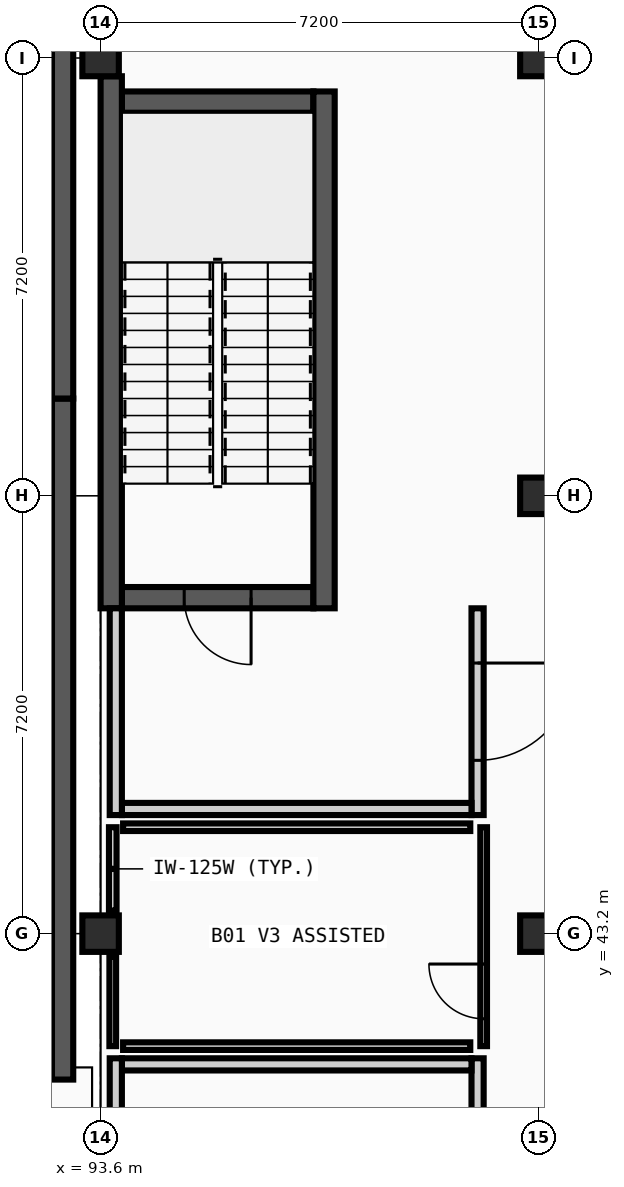
"""IFC4 building model, lengths in metres.
Left out: names, types, materials, properties, quantities, classifications, styles, units other than length and angle.
Written with IfcOpenShell. Run it as: python <this file> out.ifc"""

import sys

from ifc_helpers import new_model, si_unit, direction, frame, frame_2d, origin, origin_2d, place, context, subcontext, project, spatial, rectangle, extrude, element, fill, save


model = new_model("IFC4")
c1 = context("Model", 3, precision=1e-05, world=origin(), true_north=direction((0.0, 1.0)))
c2 = subcontext(c1, "Body", "Model", "MODEL_VIEW")
j1 = project(units=[si_unit("LENGTHUNIT", "METRE"), si_unit("PLANEANGLEUNIT", "RADIAN")], contexts=[c1])
p1 = place(None, origin())
s1 = spatial("IfcSite", under=j1, at=p1, CompositionType="ELEMENT")
p2 = place(p1, origin())
s2 = spatial("IfcBuilding", under=s1, at=p2, CompositionType="ELEMENT")
p3 = place(p2, frame((0.0, 0.0, -4.8)))
s3 = spatial("IfcBuildingStorey", under=s2, at=p3, CompositionType="ELEMENT", Elevation=-4.8)
for number, where, z_axis, x_axis in (
    (1, (93.6, 43.2, 0.0), (0.0, 0.0, 1.0), (1.0, 0.0, 0.0)),
    (2, (93.6, 57.6, 0.0), (0.0, 0.0, 1.0), (1.0, 0.0, 0.0)),
    (3, (100.8, 43.2, 0.0), (0.0, 0.0, 1.0), (1.0, 0.0, 0.0)),
    (4, (100.8, 50.4, 0.0), (0.0, 0.0, 1.0), (1.0, 0.0, 0.0)),
    (5, (100.8, 57.6, 0.0), (0.0, 0.0, 1.0), (1.0, 0.0, 0.0)),
):
    element("IfcColumn", number, at=place(p3, frame(where, z_axis=z_axis, x_axis=x_axis)), inside=s3, PredefinedType="COLUMN", context=c2, shape_type="SweptSolid", body=[
        extrude(rectangle(XDim=0.6, YDim=0.6, at=origin_2d()), origin(), (0.0, 0.0, 1.0), 4.8),
    ])
p4 = place(p3, frame((92.975, 40.8, 0.0), z_axis=(0.0, 0.0, 1.0), x_axis=(0.0, 1.0, 0.0)))
e6 = element("IfcWall", 6, at=p4, inside=s3, PredefinedType="USERDEFINED", context=c2, shape_type="SweptSolid", body=[
    extrude(rectangle(XDim=11.2, YDim=0.35, at=frame_2d((5.6, 0.0))), origin(), (0.0, 0.0, 1.0), 4.58),
])
p5 = place(p3, frame((92.975, 52.0, 0.0), z_axis=(0.0, 0.0, 1.0), x_axis=(0.0, 1.0, 0.0)))
e7 = element("IfcWall", 7, at=p5, inside=s3, PredefinedType="USERDEFINED", context=c2, shape_type="SweptSolid", body=[
    extrude(rectangle(XDim=11.0, YDim=0.35, at=frame_2d((5.5, 0.0))), origin(), (0.0, 0.0, 1.0), 4.58),
])
p6 = place(p3, frame((99.8, 37.75, 0.0), z_axis=(0.0, 0.0, 1.0), x_axis=(0.0, 1.0, 0.0)))
e8 = element("IfcWall", 8, at=p6, inside=s3, PredefinedType="PARTITIONING", context=c2, shape_type="SweptSolid", body=[
    extrude(rectangle(XDim=3.4, YDim=0.2, at=frame_2d((1.7, 0.0))), origin(), (0.0, 0.0, 1.0), 4.545),
])
p7 = place(p6, frame((0.9, 0.0, 0.0)))
e9 = element("IfcOpeningElement", 9, at=p7, cuts=e8, PredefinedType="OPENING", context=c2, shape_type="SweptSolid", body=[
    extrude(rectangle(XDim=1.6, YDim=2.2, at=frame_2d((0.8, 1.1))), frame((0.0, 0.11, 0.0), z_axis=(0.0, -1.0, 0.0), x_axis=(1.0, 0.0, 0.0)), (0.0, 0.0, 1.0), 0.22),
])
p8 = place(p3, frame((93.95, 41.05, 0.0), z_axis=(0.0, 0.0, 1.0), x_axis=(1.0, 0.0, 0.0)))
e10 = element("IfcWall", 10, at=p8, inside=s3, PredefinedType="PARTITIONING", context=c2, shape_type="SweptSolid", body=[
    extrude(rectangle(XDim=5.75, YDim=0.2, at=frame_2d((2.875, 0.0))), origin(), (0.0, 0.0, 1.0), 4.545),
])
p9 = place(p3, frame((93.85, 37.75, 0.0), z_axis=(0.0, 0.0, 1.0), x_axis=(0.0, 1.0, 0.0)))
e11 = element("IfcWall", 11, at=p9, inside=s3, PredefinedType="PARTITIONING", context=c2, shape_type="SweptSolid", body=[
    extrude(rectangle(XDim=3.4, YDim=0.2, at=frame_2d((1.7, 0.0))), origin(), (0.0, 0.0, 1.0), 4.545),
])
p10 = place(p3, frame((93.95, 48.725, 0.0), z_axis=(0.0, 0.0, 1.0), x_axis=(1.0, 0.0, 0.0)))
e12 = element("IfcWall", 12, at=p10, inside=s3, PredefinedType="SHEAR", context=c2, shape_type="SweptSolid", body=[
    extrude(rectangle(XDim=3.15, YDim=0.35, at=frame_2d((1.575, 0.0))), origin(), (0.0, 0.0, 1.0), 4.545),
])
p11 = place(p10, frame((1.025, 0.0, 0.0)))
e13 = element("IfcOpeningElement", 13, at=p11, cuts=e12, PredefinedType="OPENING", context=c2, shape_type="SweptSolid", body=[
    extrude(rectangle(XDim=1.1, YDim=2.15, at=frame_2d((0.55, 1.075))), frame((0.0, 0.185, 0.0), z_axis=(0.0, -1.0, 0.0), x_axis=(1.0, 0.0, 0.0)), (0.0, 0.0, 1.0), 0.37),
])
p12 = place(p3, frame((93.95, 56.875, 0.0), z_axis=(0.0, 0.0, 1.0), x_axis=(1.0, 0.0, 0.0)))
e14 = element("IfcWall", 14, at=p12, inside=s3, PredefinedType="SHEAR", context=c2, shape_type="SweptSolid", body=[
    extrude(rectangle(XDim=3.15, YDim=0.35, at=frame_2d((1.575, 0.0))), origin(), (0.0, 0.0, 1.0), 4.545),
])
p13 = place(p3, frame((93.775, 48.55, 0.0), z_axis=(0.0, 0.0, 1.0), x_axis=(0.0, 1.0, 0.0)))
e15 = element("IfcWall", 15, at=p13, inside=s3, PredefinedType="SHEAR", context=c2, shape_type="SweptSolid", body=[
    extrude(rectangle(XDim=8.75, YDim=0.35, at=frame_2d((4.375, 0.0))), origin(), (0.0, 0.0, 1.0), 4.545),
])
p14 = place(p3, frame((97.275, 48.55, 0.0), z_axis=(0.0, 0.0, 1.0), x_axis=(0.0, 1.0, 0.0)))
e16 = element("IfcWall", 16, at=p14, inside=s3, PredefinedType="SHEAR", context=c2, shape_type="SweptSolid", body=[
    extrude(rectangle(XDim=8.5, YDim=0.35, at=frame_2d((4.25, 0.0))), origin(), (0.0, 0.0, 1.0), 4.545),
])
p15 = place(p3, frame((99.8, 45.15, 0.0), z_axis=(0.0, 0.0, 1.0), x_axis=(0.0, 1.0, 0.0)))
e17 = element("IfcWall", 17, at=p15, inside=s3, PredefinedType="PARTITIONING", context=c2, shape_type="SweptSolid", body=[
    extrude(rectangle(XDim=3.4, YDim=0.2, at=frame_2d((1.7, 0.0))), origin(), (0.0, 0.0, 1.0), 4.545),
])
p16 = place(p15, frame((0.9, 0.0, 0.0)))
e18 = element("IfcOpeningElement", 18, at=p16, cuts=e17, PredefinedType="OPENING", context=c2, shape_type="SweptSolid", body=[
    extrude(rectangle(XDim=1.6, YDim=2.2, at=frame_2d((0.8, 1.1))), frame((0.0, 0.11, 0.0), z_axis=(0.0, -1.0, 0.0), x_axis=(1.0, 0.0, 0.0)), (0.0, 0.0, 1.0), 0.22),
])
p17 = place(p3, frame((93.95, 45.25, 0.0), z_axis=(0.0, 0.0, 1.0), x_axis=(1.0, 0.0, 0.0)))
e19 = element("IfcWall", 19, at=p17, inside=s3, PredefinedType="PARTITIONING", context=c2, shape_type="SweptSolid", body=[
    extrude(rectangle(XDim=5.75, YDim=0.2, at=frame_2d((2.875, 0.0))), origin(), (0.0, 0.0, 1.0), 4.545),
])
p18 = place(p3, frame((93.85, 45.15, 0.0), z_axis=(0.0, 0.0, 1.0), x_axis=(0.0, 1.0, 0.0)))
e20 = element("IfcWall", 20, at=p18, inside=s3, PredefinedType="PARTITIONING", context=c2, shape_type="SweptSolid", body=[
    extrude(rectangle(XDim=3.4, YDim=0.2, at=frame_2d((1.7, 0.0))), origin(), (0.0, 0.0, 1.0), 4.545),
])
for number, where, z_axis, x_axis in (
    (21, (93.97, 41.35, 0.0), (0.0, 0.0, 1.0), (1.0, 0.0, 0.0)),
    (22, (93.97, 44.95, 0.0), (0.0, 0.0, 1.0), (1.0, 0.0, 0.0)),
):
    element("IfcWall", number, at=place(p3, frame(where, z_axis=z_axis, x_axis=x_axis)), inside=s3, PredefinedType="PARTITIONING", context=c2, shape_type="SweptSolid", body=[
        extrude(rectangle(XDim=5.71, YDim=0.125, at=frame_2d((2.855, 0.0))), origin(), (0.0, 0.0, 1.0), 4.545),
    ])
p19 = place(p3, frame((93.8, 41.35, 0.0), z_axis=(0.0, 0.0, 1.0), x_axis=(0.0, 1.0, 0.0)))
e23 = element("IfcWall", 23, at=p19, inside=s3, PredefinedType="PARTITIONING", context=c2, shape_type="SweptSolid", body=[
    extrude(rectangle(XDim=1.47, YDim=0.11, at=frame_2d((0.735, 0.0))), origin(), (0.0, 0.0, 1.0), 4.545),
])
p20 = place(p3, frame((93.8, 43.58, 0.0), z_axis=(0.0, 0.0, 1.0), x_axis=(0.0, 1.0, 0.0)))
e24 = element("IfcWall", 24, at=p20, inside=s3, PredefinedType="PARTITIONING", context=c2, shape_type="SweptSolid", body=[
    extrude(rectangle(XDim=1.37, YDim=0.125, at=frame_2d((0.685, 0.0))), origin(), (0.0, 0.0, 1.0), 4.545),
])
p21 = place(p3, frame((99.9, 41.35, 0.0), z_axis=(0.0, 0.0, 1.0), x_axis=(0.0, 1.0, 0.0)))
e25 = element("IfcWall", 25, at=p21, inside=s3, PredefinedType="PARTITIONING", context=c2, shape_type="SweptSolid", body=[
    extrude(rectangle(XDim=3.6, YDim=0.11, at=frame_2d((1.8, 0.0))), origin(), (0.0, 0.0, 1.0), 4.545),
])
p22 = place(p21, frame((0.45, 0.0, 0.0)))
e26 = element("IfcOpeningElement", 26, at=p22, cuts=e25, PredefinedType="OPENING", context=c2, shape_type="SweptSolid", body=[
    extrude(rectangle(XDim=0.9, YDim=2.1, at=frame_2d((0.45, 1.05))), frame((0.0, 0.065, 0.0), z_axis=(0.0, -1.0, 0.0), x_axis=(1.0, 0.0, 0.0)), (0.0, 0.0, 1.0), 0.13),
])
p23 = place(p11, origin())
e27 = element("IfcDoor", 27, at=p23, inside=s3, OperationType="SINGLE_SWING_RIGHT", PredefinedType="DOOR", context=c2, shape_type="SweptSolid", body=[
    extrude(rectangle(XDim=1.1, YDim=2.15, at=frame_2d((0.55, 1.075))), frame((0.0, 0.025, 0.0), z_axis=(0.0, -1.0, 0.0), x_axis=(1.0, 0.0, 0.0)), (0.0, 0.0, 1.0), 0.05),
])
fill(e13, e27)
p24 = place(p16, origin())
e28 = element("IfcDoor", 28, at=p24, inside=s3, OperationType="DOUBLE_DOOR_SINGLE_SWING", PredefinedType="DOOR", context=c2, shape_type="SweptSolid", body=[
    extrude(rectangle(XDim=1.6, YDim=2.2, at=frame_2d((0.8, 1.1))), frame((0.0, 0.025, 0.0), z_axis=(0.0, -1.0, 0.0), x_axis=(1.0, 0.0, 0.0)), (0.0, 0.0, 1.0), 0.05),
])
fill(e18, e28)
p25 = place(p22, frame((0.9, 0.0, 0.0), z_axis=(0.0, 0.0, 1.0), x_axis=(-1.0, 0.0, 0.0)))
e29 = element("IfcDoor", 29, at=p25, inside=s3, OperationType="SINGLE_SWING_RIGHT", PredefinedType="DOOR", context=c2, shape_type="SweptSolid", body=[
    extrude(rectangle(XDim=0.9, YDim=2.1, at=frame_2d((0.45, 1.05))), frame((0.0, 0.025, 0.0), z_axis=(0.0, -1.0, 0.0), x_axis=(1.0, 0.0, 0.0)), (0.0, 0.0, 1.0), 0.05),
])
fill(e26, e29)
save(model, sys.argv[1])
